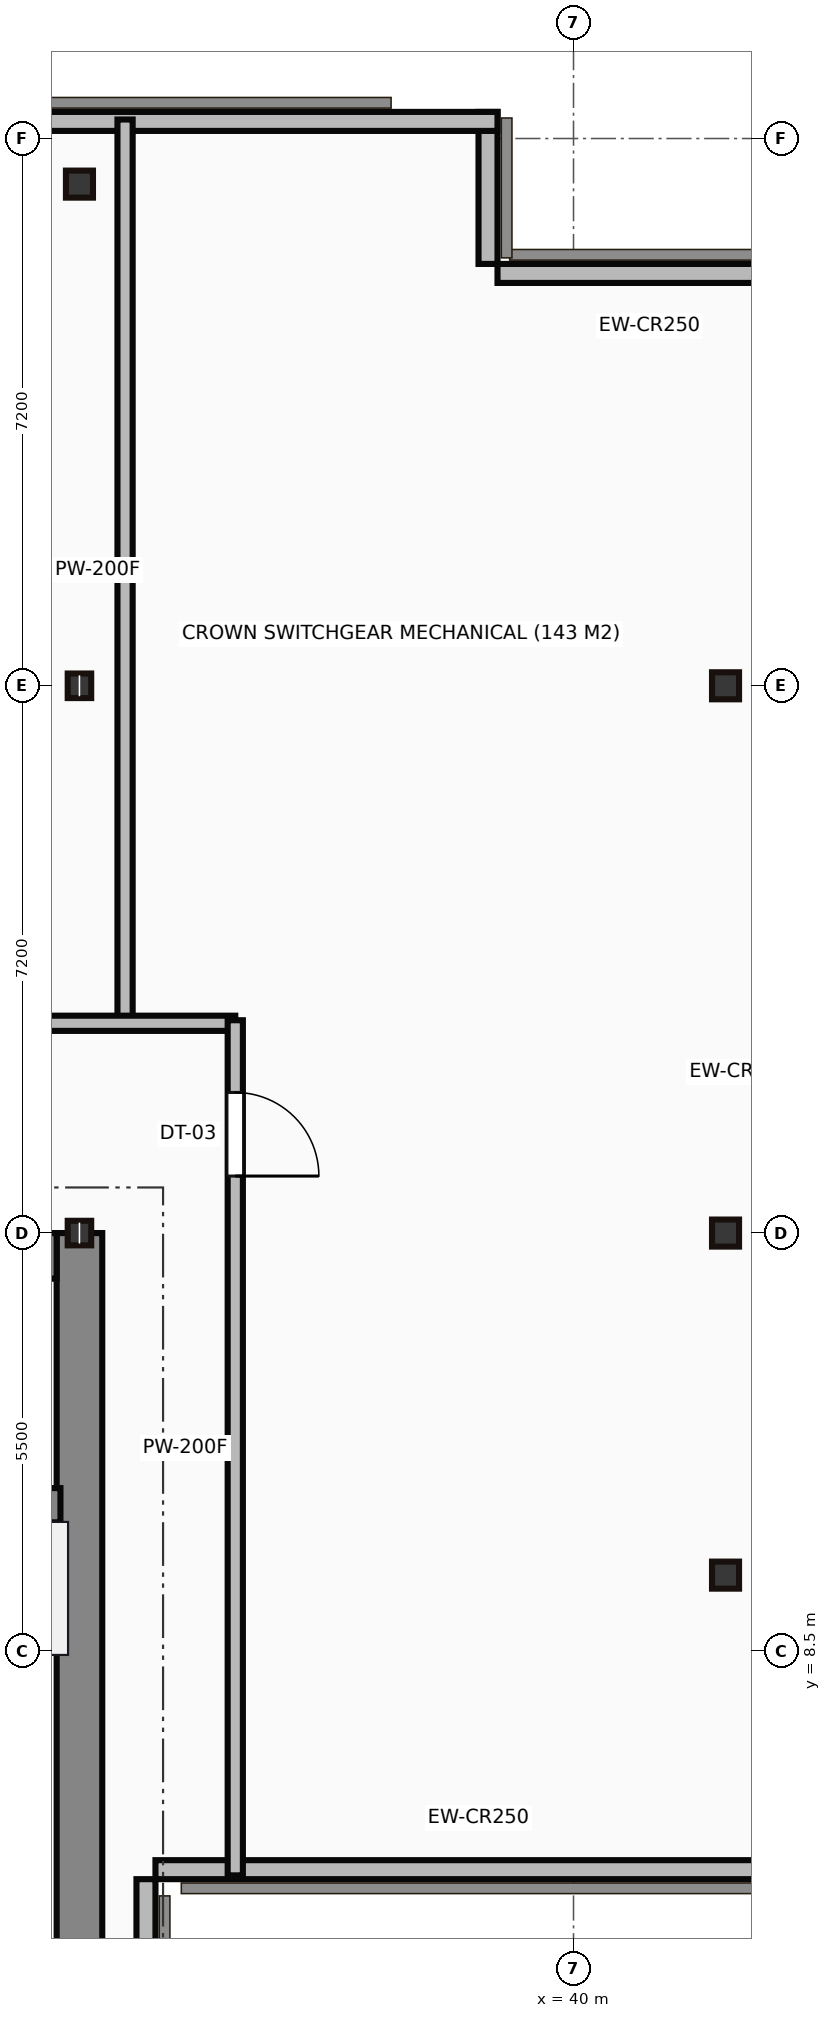
"""IFC4 building model, lengths in metres.
Left out: names, types, materials, properties, quantities, classifications, styles, units other than length and angle.
Written with IfcOpenShell. Run it as: python <this file> out.ifc"""

import sys

from ifc_helpers import new_model, si_unit, direction, frame, frame_2d, origin, origin_2d, place, context, subcontext, project, spatial, rectangle, hollow_rectangle, i_section, extrude, source, transform, mapped, element, fill, save


model = new_model("IFC4")
c1 = context("Model", 3, precision=1e-05, world=origin(), true_north=direction((0.0, 1.0)))
c2 = subcontext(c1, "Body", "Model", "MODEL_VIEW")
j1 = project(units=[si_unit("LENGTHUNIT", "METRE"), si_unit("PLANEANGLEUNIT", "RADIAN")], contexts=[c1])
p1 = place(None, origin())
s1 = spatial("IfcSite", under=j1, at=p1, CompositionType="ELEMENT")
p2 = place(p1, origin())
s2 = spatial("IfcBuilding", under=s1, at=p2, CompositionType="ELEMENT")
p3 = place(p2, frame((0.0, 0.0, 311.25)))
s3 = spatial("IfcBuildingStorey", under=s2, at=p3, CompositionType="ELEMENT", Elevation=311.25)
m1 = source(origin(), c2, "Body", "SweptSolid", [
    extrude(rectangle(XDim=13.1, YDim=0.6, at=frame_2d((6.55, 0.0))), origin(), (0.0, 0.0, 1.0), 3.8),
])
p4 = place(p3, frame((33.5, 0.9, 0.0), z_axis=(0.0, 0.0, 1.0), x_axis=(0.0, 1.0, 0.0)))
e1 = element("IfcWall", 1, at=p4, inside=s3, PredefinedType="SHEAR", context=c2, shape_type="MappedRepresentation", body=[
    mapped(m1, transform((0.0, 0.0, 0.0))),
])
m2 = source(origin(), c2, "Body", "SweptSolid", [
    extrude(rectangle(XDim=12.6, YDim=0.6, at=frame_2d((6.3, 0.0))), origin(), (0.0, 0.0, 1.0), 3.8),
])
p5 = place(p3, frame((20.6, 13.7, 0.0), z_axis=(0.0, 0.0, 1.0), x_axis=(1.0, 0.0, 0.0)))
e2 = element("IfcWall", 2, at=p5, inside=s3, PredefinedType="SHEAR", context=c2, shape_type="MappedRepresentation", body=[
    mapped(m2, transform((0.0, 0.0, 0.0))),
])
p6 = place(p5, frame((9.25, 0.0, 0.0)))
e3 = element("IfcOpeningElement", 3, at=p6, cuts=e2, PredefinedType="OPENING", context=c2, shape_type="SweptSolid", body=[
    extrude(rectangle(XDim=1.1, YDim=2.15, at=frame_2d((0.55, 1.075))), frame((0.0, 0.31, 0.0), z_axis=(0.0, -1.0, 0.0), x_axis=(1.0, 0.0, 0.0)), (0.0, 0.0, 1.0), 0.62),
])
m3 = source(origin(), c2, "Body", "SweptSolid", [
    extrude(rectangle(XDim=3.39, YDim=0.45, at=frame_2d((1.695, 0.0))), origin(), (0.0, 0.0, 1.0), 3.8),
])
p7 = place(p3, frame((29.86, 10.42, 0.0), z_axis=(0.0, 0.0, 1.0), x_axis=(1.0, 0.0, 0.0)))
e4 = element("IfcWall", 4, at=p7, inside=s3, PredefinedType="SHEAR", context=c2, shape_type="MappedRepresentation", body=[
    mapped(m3, transform((0.0, 0.0, 0.0))),
])
p8 = place(p7, frame((1.1, 0.0, 0.0)))
e5 = element("IfcOpeningElement", 5, at=p8, cuts=e4, PredefinedType="OPENING", context=c2, shape_type="SweptSolid", body=[
    extrude(rectangle(XDim=1.1, YDim=2.15, at=frame_2d((0.55, 1.075))), frame((0.0, 0.235, 0.0), z_axis=(0.0, -1.0, 0.0), x_axis=(1.0, 0.0, 0.0)), (0.0, 0.0, 1.0), 0.47),
])
m4 = source(origin(), c2, "Body", "SweptSolid", [
    extrude(i_section(OverallWidth=0.309, OverallDepth=0.323, WebThickness=0.014, FlangeThickness=0.023, at=origin_2d()), origin(), (0.0, 0.0, 1.0), 3.8),
])
for number, where, z_axis, x_axis in (
    (6, (33.5, 14.0, 0.0), (0.0, 0.0, 1.0), (1.0, 0.0, 0.0)),
    (7, (33.5, 21.2, 0.0), (0.0, 0.0, 1.0), (1.0, 0.0, 0.0)),
):
    element("IfcColumn", number, at=place(p3, frame(where, z_axis=z_axis, x_axis=x_axis)), inside=s3, PredefinedType="COLUMN", context=c2, shape_type="MappedRepresentation", body=[
        mapped(m4, transform((0.0, 0.0, 0.0))),
    ])
m5 = source(origin(), c2, "Body", "SweptSolid", [
    extrude(hollow_rectangle(XDim=0.356, YDim=0.356, WallThickness=0.019, at=origin_2d()), origin(), (0.0, 0.0, 1.0), 3.8),
])
for number, where, z_axis, x_axis in (
    (8, (33.5, 27.8, 0.0), (0.0, 0.0, 1.0), (1.0, 0.0, 0.0)),
    (9, (42.0, 9.5, 0.0), (0.0, 0.0, 1.0), (1.0, 0.0, 0.0)),
    (10, (42.0, 14.0, 0.0), (0.0, 0.0, 1.0), (1.0, 0.0, 0.0)),
    (11, (42.0, 21.2, 0.0), (0.0, 0.0, 1.0), (1.0, 0.0, 0.0)),
):
    element("IfcColumn", number, at=place(p3, frame(where, z_axis=z_axis, x_axis=x_axis)), inside=s3, PredefinedType="COLUMN", context=c2, shape_type="MappedRepresentation", body=[
        mapped(m5, transform((0.0, 0.0, 0.0))),
    ])
m6 = source(origin(), c2, "Body", "SweptSolid", [
    extrude(rectangle(XDim=5.5, YDim=0.25, at=frame_2d((2.75, 0.0))), origin(), (0.0, 0.0, 1.0), 3.5),
])
p9 = place(p3, frame((34.375, 0.0, 0.0), z_axis=(0.0, 0.0, 1.0), x_axis=(0.0, 1.0, 0.0)))
e12 = element("IfcWall", 12, at=p9, inside=s3, PredefinedType="STANDARD", context=c2, shape_type="MappedRepresentation", body=[
    mapped(m6, transform((0.0, 0.0, 0.0))),
])
m7 = source(origin(), c2, "Body", "SweptSolid", [
    extrude(rectangle(XDim=8.5, YDim=0.25, at=frame_2d((4.25, 0.0))), origin(), (0.0, 0.0, 1.0), 3.5),
])
p10 = place(p3, frame((34.5, 5.625, 0.0), z_axis=(0.0, 0.0, 1.0), x_axis=(1.0, 0.0, 0.0)))
e13 = element("IfcWall", 13, at=p10, inside=s3, PredefinedType="STANDARD", context=c2, shape_type="MappedRepresentation", body=[
    mapped(m7, transform((0.0, 0.0, 0.0))),
])
m8 = source(origin(), c2, "Body", "SweptSolid", [
    extrude(rectangle(XDim=4.0, YDim=0.25, at=frame_2d((2.0, 0.0))), origin(), (0.0, 0.0, 1.0), 3.5),
])
p11 = place(p3, frame((43.0, 26.625, 0.0), z_axis=(0.0, 0.0, 1.0), x_axis=(-1.0, 0.0, 0.0)))
e14 = element("IfcWall", 14, at=p11, inside=s3, PredefinedType="STANDARD", context=c2, shape_type="MappedRepresentation", body=[
    mapped(m8, transform((0.0, 0.0, 0.0))),
])
m9 = source(origin(), c2, "Body", "SweptSolid", [
    extrude(rectangle(XDim=2.0, YDim=0.25, at=frame_2d((1.0, 0.0))), origin(), (0.0, 0.0, 1.0), 3.5),
])
p12 = place(p3, frame((38.875, 26.75, 0.0), z_axis=(0.0, 0.0, 1.0), x_axis=(0.0, 1.0, 0.0)))
e15 = element("IfcWall", 15, at=p12, inside=s3, PredefinedType="STANDARD", context=c2, shape_type="MappedRepresentation", body=[
    mapped(m9, transform((0.0, 0.0, 0.0))),
])
m10 = source(origin(), c2, "Body", "SweptSolid", [
    extrude(rectangle(XDim=35.0, YDim=0.25, at=frame_2d((17.5, 0.0))), origin(), (0.0, 0.0, 1.0), 3.5),
])
p13 = place(p3, frame((39.0, 28.625, 0.0), z_axis=(0.0, 0.0, 1.0), x_axis=(-1.0, 0.0, 0.0)))
e16 = element("IfcWall", 16, at=p13, inside=s3, PredefinedType="STANDARD", context=c2, shape_type="MappedRepresentation", body=[
    mapped(m10, transform((0.0, 0.0, 0.0))),
])
m11 = source(origin(), c2, "Body", "SweptSolid", [
    extrude(rectangle(XDim=21.6, YDim=0.2, at=frame_2d((10.8, 0.0))), origin(), (0.0, 0.0, 1.0), 3.5),
])
p14 = place(p3, frame((13.95, 16.76, 0.0), z_axis=(0.0, 0.0, 1.0), x_axis=(1.0, 0.0, 0.0)))
e17 = element("IfcWall", 17, at=p14, inside=s3, PredefinedType="PARTITIONING", context=c2, shape_type="MappedRepresentation", body=[
    mapped(m11, transform((0.0, 0.0, 0.0))),
])
p15 = place(p14, frame((2.8, 0.0, 0.0)))
e18 = element("IfcOpeningElement", 18, at=p15, cuts=e17, PredefinedType="OPENING", context=c2, shape_type="SweptSolid", body=[
    extrude(rectangle(XDim=1.1, YDim=2.15, at=frame_2d((0.55, 1.075))), frame((0.0, 0.11, 0.0), z_axis=(0.0, -1.0, 0.0), x_axis=(1.0, 0.0, 0.0)), (0.0, 0.0, 1.0), 0.22),
])
p16 = place(p14, frame((9.6, 0.0, 0.0)))
e19 = element("IfcOpeningElement", 19, at=p16, cuts=e17, PredefinedType="OPENING", context=c2, shape_type="SweptSolid", body=[
    extrude(rectangle(XDim=1.1, YDim=2.15, at=frame_2d((0.55, 1.075))), frame((0.0, 0.11, 0.0), z_axis=(0.0, -1.0, 0.0), x_axis=(1.0, 0.0, 0.0)), (0.0, 0.0, 1.0), 0.22),
])
p17 = place(p14, frame((16.0, 0.0, 0.0)))
e20 = element("IfcOpeningElement", 20, at=p17, cuts=e17, PredefinedType="OPENING", context=c2, shape_type="SweptSolid", body=[
    extrude(rectangle(XDim=1.1, YDim=2.15, at=frame_2d((0.55, 1.075))), frame((0.0, 0.11, 0.0), z_axis=(0.0, -1.0, 0.0), x_axis=(1.0, 0.0, 0.0)), (0.0, 0.0, 1.0), 0.22),
])
m12 = source(origin(), c2, "Body", "SweptSolid", [
    extrude(rectangle(XDim=11.25, YDim=0.2, at=frame_2d((5.625, 0.0))), origin(), (0.0, 0.0, 1.0), 3.5),
])
p18 = place(p3, frame((35.55, 5.55, 0.0), z_axis=(0.0, 0.0, 1.0), x_axis=(0.0, 1.0, 0.0)))
e21 = element("IfcWall", 21, at=p18, inside=s3, PredefinedType="PARTITIONING", context=c2, shape_type="MappedRepresentation", body=[
    mapped(m12, transform((0.0, 0.0, 0.0))),
])
p19 = place(p18, frame((9.2, 0.0, 0.0)))
e22 = element("IfcOpeningElement", 22, at=p19, cuts=e21, PredefinedType="OPENING", context=c2, shape_type="SweptSolid", body=[
    extrude(rectangle(XDim=1.1, YDim=2.15, at=frame_2d((0.55, 1.075))), frame((0.0, 0.11, 0.0), z_axis=(0.0, -1.0, 0.0), x_axis=(1.0, 0.0, 0.0)), (0.0, 0.0, 1.0), 0.22),
])
m13 = source(origin(), c2, "Body", "SweptSolid", [
    extrude(rectangle(XDim=11.85, YDim=0.2, at=frame_2d((5.925, 0.0))), origin(), (0.0, 0.0, 1.0), 3.5),
])
p20 = place(p3, frame((34.1, 16.8, 0.0), z_axis=(0.0, 0.0, 1.0), x_axis=(0.0, 1.0, 0.0)))
e23 = element("IfcWall", 23, at=p20, inside=s3, PredefinedType="PARTITIONING", context=c2, shape_type="MappedRepresentation", body=[
    mapped(m13, transform((0.0, 0.0, 0.0))),
])
m14 = source(origin(), c2, "Body", "SweptSolid", [
    extrude(rectangle(XDim=1.1, YDim=2.15, at=frame_2d((0.55, 1.075))), frame((0.0, 0.025, 0.0), z_axis=(0.0, -1.0, 0.0), x_axis=(1.0, 0.0, 0.0)), (0.0, 0.0, 1.0), 0.05),
])
p21 = place(p19, frame((1.1, 0.0, 0.0), z_axis=(0.0, 0.0, 1.0), x_axis=(-1.0, 0.0, 0.0)))
e24 = element("IfcDoor", 24, at=p21, inside=s3, OperationType="SINGLE_SWING_LEFT", PredefinedType="DOOR", context=c2, shape_type="MappedRepresentation", body=[
    mapped(m14, transform((0.0, 0.0, 0.0))),
])
fill(e22, e24)
save(model, sys.argv[1])
